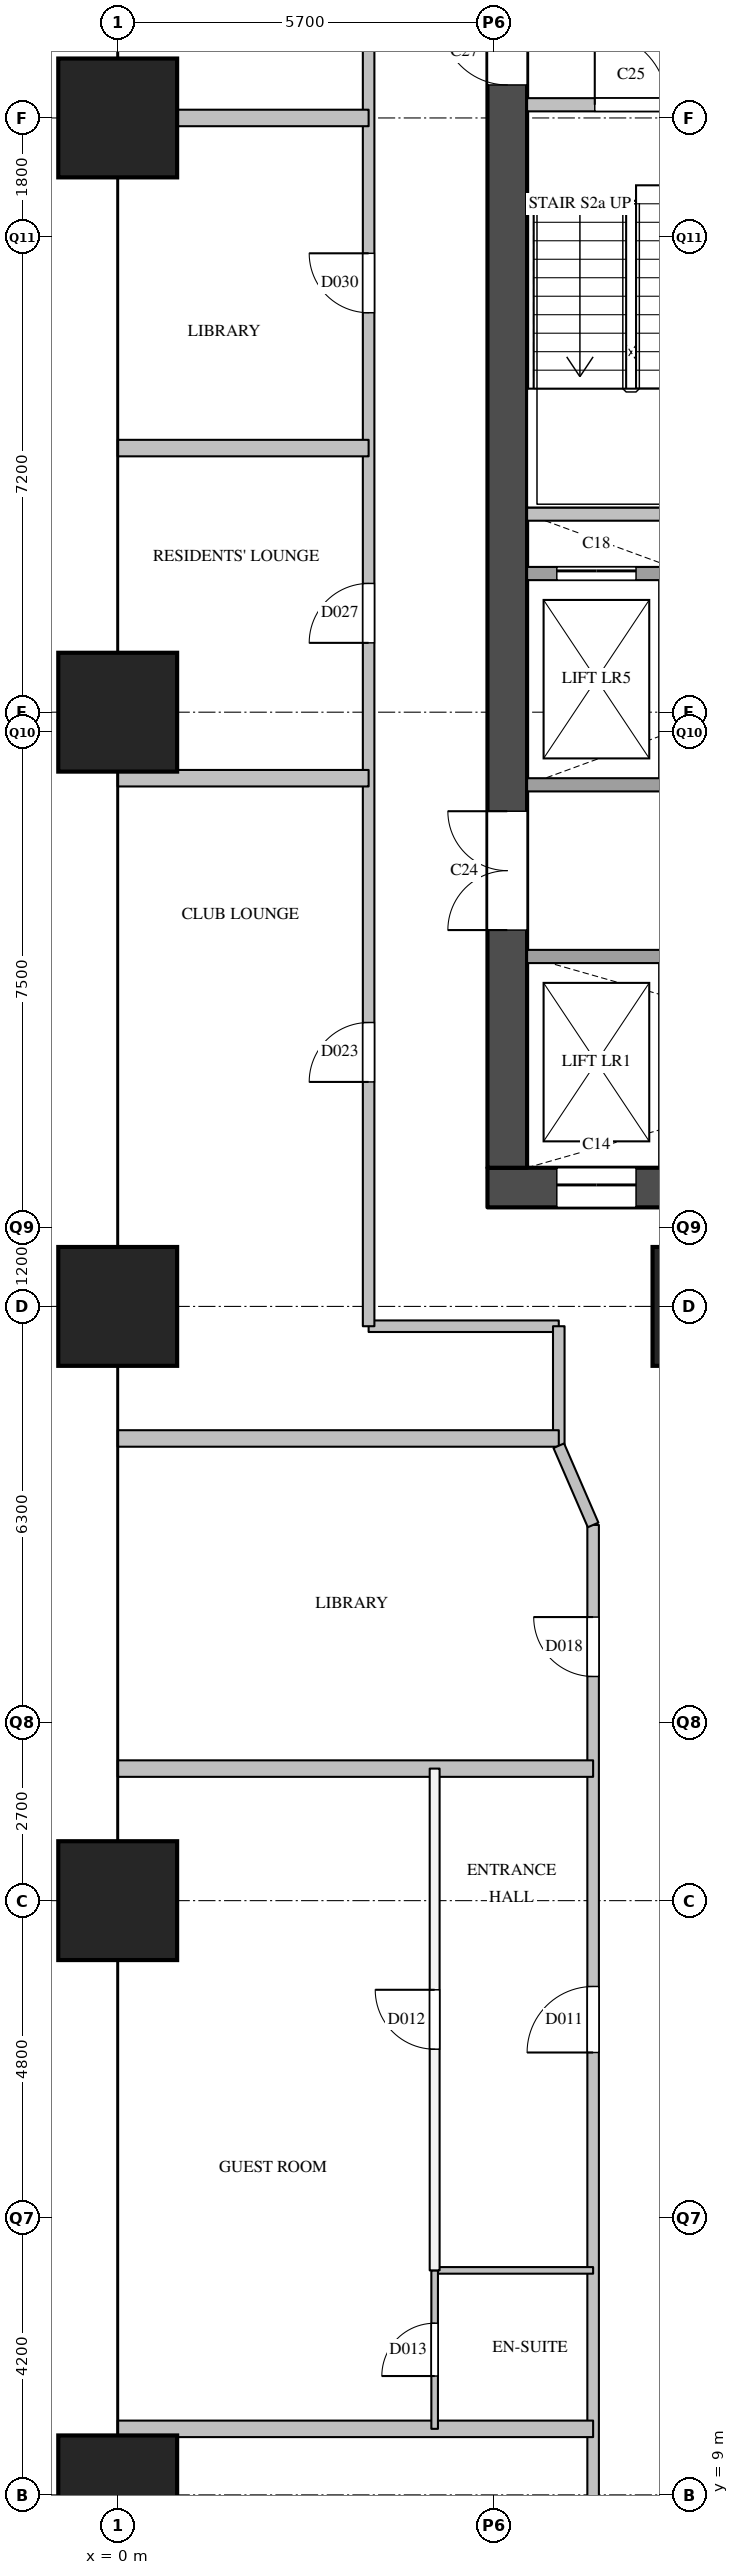
"""IFC4 building model, lengths in metres.
Left out: names, types, materials, properties, quantities, classifications, styles, units other than length and angle.
Written with IfcOpenShell. Run it as: python <this file> out.ifc"""

import sys

from ifc_helpers import new_model, si_unit, direction, frame, frame_2d, origin, origin_2d, place, context, subcontext, project, spatial, rectangle, extrude, element, fill, save


model = new_model("IFC4")
c1 = context("Model", 3, precision=1e-05, world=origin(), true_north=direction((0.0, 1.0)))
c2 = subcontext(c1, "Body", "Model", "MODEL_VIEW")
j1 = project(units=[si_unit("LENGTHUNIT", "METRE"), si_unit("PLANEANGLEUNIT", "RADIAN")], contexts=[c1])
p1 = place(None, origin())
s1 = spatial("IfcSite", under=j1, at=p1, CompositionType="ELEMENT")
p2 = place(p1, origin())
s2 = spatial("IfcBuilding", under=s1, at=p2, CompositionType="ELEMENT")
p3 = place(p2, frame((0.0, 0.0, 42.4)))
s3 = spatial("IfcBuildingStorey", under=s2, at=p3, CompositionType="ELEMENT", Elevation=42.4)
for number, where, z_axis, x_axis in (
    (1, (0.0, 9.0, 0.0), (0.0, 0.0, 1.0), (1.0, 0.0, 0.0)),
    (2, (0.0, 18.0, 0.0), (0.0, 0.0, 1.0), (1.0, 0.0, 0.0)),
    (3, (0.0, 27.0, 0.0), (0.0, 0.0, 1.0), (1.0, 0.0, 0.0)),
    (4, (0.0, 36.0, 0.0), (0.0, 0.0, 1.0), (1.0, 0.0, 0.0)),
    (5, (0.0, 45.0, 0.0), (0.0, 0.0, 1.0), (1.0, 0.0, 0.0)),
    (6, (9.0, 27.0, 0.0), (0.0, 0.0, 1.0), (1.0, 0.0, 0.0)),
):
    element("IfcColumn", number, at=place(p3, frame(where, z_axis=z_axis, x_axis=x_axis)), inside=s3, PredefinedType="COLUMN", context=c2, shape_type="SweptSolid", body=[
        extrude(rectangle(XDim=1.8, YDim=1.8, at=origin_2d()), origin(), (0.0, 0.0, 1.0), 3.8),
    ])
p4 = place(p3, frame((5.6, 28.8, 0.0), z_axis=(0.0, 0.0, 1.0), x_axis=(1.0, 0.0, 0.0)))
e7 = element("IfcWall", 7, at=p4, inside=s3, PredefinedType="SHEAR", context=c2, shape_type="SweptSolid", body=[
    extrude(rectangle(XDim=12.4, YDim=0.6, at=frame_2d((6.2, 0.0))), origin(), (0.0, 0.0, 1.0), 3.5),
])
p5 = place(p4, frame((1.05, 0.0, 0.0)))
e8 = element("IfcOpeningElement", 8, at=p5, cuts=e7, PredefinedType="OPENING", context=c2, shape_type="SweptSolid", body=[
    extrude(rectangle(XDim=1.2, YDim=2.1, at=frame_2d((0.6, 1.05))), frame((0.0, 0.31, 0.0), z_axis=(0.0, -1.0, 0.0), x_axis=(1.0, 0.0, 0.0)), (0.0, 0.0, 1.0), 0.62),
])
p6 = place(p4, frame((5.25, 0.0, 0.0)))
e9 = element("IfcOpeningElement", 9, at=p6, cuts=e7, PredefinedType="OPENING", context=c2, shape_type="SweptSolid", body=[
    extrude(rectangle(XDim=1.2, YDim=2.1, at=frame_2d((0.6, 1.05))), frame((0.0, 0.31, 0.0), z_axis=(0.0, -1.0, 0.0), x_axis=(1.0, 0.0, 0.0)), (0.0, 0.0, 1.0), 0.62),
])
p7 = place(p4, frame((7.35, 0.0, 0.0)))
e10 = element("IfcOpeningElement", 10, at=p7, cuts=e7, PredefinedType="OPENING", context=c2, shape_type="SweptSolid", body=[
    extrude(rectangle(XDim=1.2, YDim=2.1, at=frame_2d((0.6, 1.05))), frame((0.0, 0.31, 0.0), z_axis=(0.0, -1.0, 0.0), x_axis=(1.0, 0.0, 0.0)), (0.0, 0.0, 1.0), 0.62),
])
p8 = place(p3, frame((5.9, 29.1, 0.0), z_axis=(0.0, 0.0, 1.0), x_axis=(0.0, 1.0, 0.0)))
e11 = element("IfcWall", 11, at=p8, inside=s3, PredefinedType="SHEAR", context=c2, shape_type="SweptSolid", body=[
    extrude(rectangle(XDim=20.3, YDim=0.6, at=frame_2d((10.15, 0.0))), origin(), (0.0, 0.0, 1.0), 3.5),
])
p9 = place(p8, frame((3.6, 0.0, 0.0)))
e12 = element("IfcOpeningElement", 12, at=p9, cuts=e11, PredefinedType="OPENING", context=c2, shape_type="SweptSolid", body=[
    extrude(rectangle(XDim=1.8, YDim=2.1, at=frame_2d((0.9, 1.05))), frame((0.0, 0.31, 0.0), z_axis=(0.0, -1.0, 0.0), x_axis=(1.0, 0.0, 0.0)), (0.0, 0.0, 1.0), 0.62),
])
p10 = place(p8, frame((16.4, 0.0, 0.0)))
e13 = element("IfcOpeningElement", 13, at=p10, cuts=e11, PredefinedType="OPENING", context=c2, shape_type="SweptSolid", body=[
    extrude(rectangle(XDim=1.0, YDim=2.1, at=frame_2d((0.5, 1.05))), frame((0.0, 0.31, 0.0), z_axis=(0.0, -1.0, 0.0), x_axis=(1.0, 0.0, 0.0)), (0.0, 0.0, 1.0), 0.62),
])
p11 = place(p3, frame((6.2, 32.3, 0.0), z_axis=(0.0, 0.0, 1.0), x_axis=(1.0, 0.0, 0.0)))
e14 = element("IfcWall", 14, at=p11, inside=s3, PredefinedType="SOLIDWALL", context=c2, shape_type="SweptSolid", body=[
    extrude(rectangle(XDim=11.2, YDim=0.2, at=frame_2d((5.6, 0.0))), origin(), (0.0, 0.0, 1.0), 3.5),
])
p12 = place(p11, frame((2.55, 0.0, 0.0)))
e15 = element("IfcOpeningElement", 15, at=p12, cuts=e14, PredefinedType="OPENING", context=c2, shape_type="SweptSolid", body=[
    extrude(rectangle(XDim=1.2, YDim=2.1, at=frame_2d((0.6, 1.05))), frame((0.0, 0.11, 0.0), z_axis=(0.0, -1.0, 0.0), x_axis=(1.0, 0.0, 0.0)), (0.0, 0.0, 1.0), 0.22),
])
p13 = place(p3, frame((6.2, 34.9, 0.0), z_axis=(0.0, 0.0, 1.0), x_axis=(1.0, 0.0, 0.0)))
e16 = element("IfcWall", 16, at=p13, inside=s3, PredefinedType="SOLIDWALL", context=c2, shape_type="SweptSolid", body=[
    extrude(rectangle(XDim=11.2, YDim=0.2, at=frame_2d((5.6, 0.0))), origin(), (0.0, 0.0, 1.0), 3.5),
])
p14 = place(p3, frame((6.2, 38.1, 0.0), z_axis=(0.0, 0.0, 1.0), x_axis=(1.0, 0.0, 0.0)))
e17 = element("IfcWall", 17, at=p14, inside=s3, PredefinedType="SOLIDWALL", context=c2, shape_type="SweptSolid", body=[
    extrude(rectangle(XDim=11.2, YDim=0.2, at=frame_2d((5.6, 0.0))), origin(), (0.0, 0.0, 1.0), 3.5),
])
p15 = place(p14, frame((0.45, 0.0, 0.0)))
e18 = element("IfcOpeningElement", 18, at=p15, cuts=e17, PredefinedType="OPENING", context=c2, shape_type="SweptSolid", body=[
    extrude(rectangle(XDim=1.2, YDim=2.1, at=frame_2d((0.6, 1.05))), frame((0.0, 0.11, 0.0), z_axis=(0.0, -1.0, 0.0), x_axis=(1.0, 0.0, 0.0)), (0.0, 0.0, 1.0), 0.22),
])
p16 = place(p14, frame((2.55, 0.0, 0.0)))
e19 = element("IfcOpeningElement", 19, at=p16, cuts=e17, PredefinedType="OPENING", context=c2, shape_type="SweptSolid", body=[
    extrude(rectangle(XDim=1.2, YDim=2.1, at=frame_2d((0.6, 1.05))), frame((0.0, 0.11, 0.0), z_axis=(0.0, -1.0, 0.0), x_axis=(1.0, 0.0, 0.0)), (0.0, 0.0, 1.0), 0.22),
])
p17 = place(p14, frame((4.65, 0.0, 0.0)))
e20 = element("IfcOpeningElement", 20, at=p17, cuts=e17, PredefinedType="OPENING", context=c2, shape_type="SweptSolid", body=[
    extrude(rectangle(XDim=1.2, YDim=2.1, at=frame_2d((0.6, 1.05))), frame((0.0, 0.11, 0.0), z_axis=(0.0, -1.0, 0.0), x_axis=(1.0, 0.0, 0.0)), (0.0, 0.0, 1.0), 0.22),
])
p18 = place(p14, frame((6.75, 0.0, 0.0)))
e21 = element("IfcOpeningElement", 21, at=p18, cuts=e17, PredefinedType="OPENING", context=c2, shape_type="SweptSolid", body=[
    extrude(rectangle(XDim=1.2, YDim=2.1, at=frame_2d((0.6, 1.05))), frame((0.0, 0.11, 0.0), z_axis=(0.0, -1.0, 0.0), x_axis=(1.0, 0.0, 0.0)), (0.0, 0.0, 1.0), 0.22),
])
p19 = place(p3, frame((6.2, 39.0, 0.0), z_axis=(0.0, 0.0, 1.0), x_axis=(1.0, 0.0, 0.0)))
e22 = element("IfcWall", 22, at=p19, inside=s3, PredefinedType="SOLIDWALL", context=c2, shape_type="SweptSolid", body=[
    extrude(rectangle(XDim=3.05, YDim=0.2, at=frame_2d((1.525, 0.0))), origin(), (0.0, 0.0, 1.0), 3.5),
])
p20 = place(p3, frame((6.2, 45.2, 0.0), z_axis=(0.0, 0.0, 1.0), x_axis=(1.0, 0.0, 0.0)))
e23 = element("IfcWall", 23, at=p20, inside=s3, PredefinedType="SOLIDWALL", context=c2, shape_type="SweptSolid", body=[
    extrude(rectangle(XDim=6.3, YDim=0.2, at=frame_2d((3.15, 0.0))), origin(), (0.0, 0.0, 1.0), 3.5),
])
p21 = place(p20, frame((1.025, 0.0, 0.0)))
e24 = element("IfcOpeningElement", 24, at=p21, cuts=e23, PredefinedType="OPENING", context=c2, shape_type="SweptSolid", body=[
    extrude(rectangle(XDim=1.1, YDim=2.1, at=frame_2d((0.55, 1.05))), frame((0.0, 0.11, 0.0), z_axis=(0.0, -1.0, 0.0), x_axis=(1.0, 0.0, 0.0)), (0.0, 0.0, 1.0), 0.22),
])
p22 = place(p20, frame((4.175, 0.0, 0.0)))
e25 = element("IfcOpeningElement", 25, at=p22, cuts=e23, PredefinedType="OPENING", context=c2, shape_type="SweptSolid", body=[
    extrude(rectangle(XDim=1.1, YDim=2.1, at=frame_2d((0.55, 1.05))), frame((0.0, 0.11, 0.0), z_axis=(0.0, -1.0, 0.0), x_axis=(1.0, 0.0, 0.0)), (0.0, 0.0, 1.0), 0.22),
])
p23 = place(p3, frame((3.8, 26.7, 0.0), z_axis=(0.0, 0.0, 1.0), x_axis=(1.0, 0.0, 0.0)))
e26 = element("IfcWall", 26, at=p23, inside=s3, PredefinedType="PARTITIONING", context=c2, shape_type="SweptSolid", body=[
    extrude(rectangle(XDim=2.88, YDim=0.175, at=frame_2d((1.44, 0.0))), origin(), (0.0, 0.0, 1.0), 2.5),
])
p24 = place(p3, frame((3.8, 26.7, 0.0), z_axis=(0.0, 0.0, 1.0), x_axis=(0.0, 1.0, 0.0)))
e27 = element("IfcWall", 27, at=p24, inside=s3, PredefinedType="PARTITIONING", context=c2, shape_type="SweptSolid", body=[
    extrude(rectangle(XDim=25.1, YDim=0.175, at=frame_2d((12.55, 0.0))), origin(), (0.0, 0.0, 1.0), 2.5),
])
p25 = place(p24, frame((3.7, 0.0, 0.0)))
e28 = element("IfcOpeningElement", 28, at=p25, cuts=e27, PredefinedType="OPENING", context=c2, shape_type="SweptSolid", body=[
    extrude(rectangle(XDim=0.9, YDim=2.1, at=frame_2d((0.45, 1.05))), frame((0.0, 0.097, 0.0), z_axis=(0.0, -1.0, 0.0), x_axis=(1.0, 0.0, 0.0)), (0.0, 0.0, 1.0), 0.195),
])
p26 = place(p24, frame((10.35, 0.0, 0.0)))
e29 = element("IfcOpeningElement", 29, at=p26, cuts=e27, PredefinedType="OPENING", context=c2, shape_type="SweptSolid", body=[
    extrude(rectangle(XDim=0.9, YDim=2.1, at=frame_2d((0.45, 1.05))), frame((0.0, 0.097, 0.0), z_axis=(0.0, -1.0, 0.0), x_axis=(1.0, 0.0, 0.0)), (0.0, 0.0, 1.0), 0.195),
])
p27 = place(p24, frame((15.35, 0.0, 0.0)))
e30 = element("IfcOpeningElement", 30, at=p27, cuts=e27, PredefinedType="OPENING", context=c2, shape_type="SweptSolid", body=[
    extrude(rectangle(XDim=0.9, YDim=2.1, at=frame_2d((0.45, 1.05))), frame((0.0, 0.097, 0.0), z_axis=(0.0, -1.0, 0.0), x_axis=(1.0, 0.0, 0.0)), (0.0, 0.0, 1.0), 0.195),
])
p28 = place(p24, frame((21.25, 0.0, 0.0)))
e31 = element("IfcOpeningElement", 31, at=p28, cuts=e27, PredefinedType="OPENING", context=c2, shape_type="SweptSolid", body=[
    extrude(rectangle(XDim=0.9, YDim=2.1, at=frame_2d((0.45, 1.05))), frame((0.0, 0.097, 0.0), z_axis=(0.0, -1.0, 0.0), x_axis=(1.0, 0.0, 0.0)), (0.0, 0.0, 1.0), 0.195),
])
p29 = place(p3, frame((6.68, 24.89, 0.0), z_axis=(0.0, 0.0, 1.0), x_axis=(0.0, 1.0, 0.0)))
e32 = element("IfcWall", 32, at=p29, inside=s3, PredefinedType="PARTITIONING", context=c2, shape_type="SweptSolid", body=[
    extrude(rectangle(XDim=1.81, YDim=0.175, at=frame_2d((0.905, 0.0))), origin(), (0.0, 0.0, 1.0), 2.5),
])
p30 = place(p3, frame((7.2, 7.2, 0.0), z_axis=(0.0, 0.0, 1.0), x_axis=(0.0, 1.0, 0.0)))
e33 = element("IfcWall", 33, at=p30, inside=s3, PredefinedType="PARTITIONING", context=c2, shape_type="SweptSolid", body=[
    extrude(rectangle(XDim=16.49, YDim=0.175, at=frame_2d((8.245, 0.0))), origin(), (0.0, 0.0, 1.0), 3.5),
])
p31 = place(p30, frame((8.5, 0.0, 0.0)))
e34 = element("IfcOpeningElement", 34, at=p31, cuts=e33, PredefinedType="OPENING", context=c2, shape_type="SweptSolid", body=[
    extrude(rectangle(XDim=1.0, YDim=2.1, at=frame_2d((0.5, 1.05))), frame((0.0, 0.097, 0.0), z_axis=(0.0, -1.0, 0.0), x_axis=(1.0, 0.0, 0.0)), (0.0, 0.0, 1.0), 0.195),
])
p32 = place(p30, frame((14.195, 0.0, 0.0)))
e35 = element("IfcOpeningElement", 35, at=p32, cuts=e33, PredefinedType="OPENING", context=c2, shape_type="SweptSolid", body=[
    extrude(rectangle(XDim=0.9, YDim=2.1, at=frame_2d((0.45, 1.05))), frame((0.0, 0.097, 0.0), z_axis=(0.0, -1.0, 0.0), x_axis=(1.0, 0.0, 0.0)), (0.0, 0.0, 1.0), 0.195),
])
p33 = place(p3, frame((4.8, 12.4, 0.0), z_axis=(0.0, 0.0, 1.0), x_axis=(0.0, 1.0, 0.0)))
e36 = element("IfcWall", 36, at=p33, inside=s3, PredefinedType="PARTITIONING", context=c2, shape_type="SweptSolid", body=[
    extrude(rectangle(XDim=7.6, YDim=0.15, at=frame_2d((3.8, 0.0))), origin(), (0.0, 0.0, 1.0), 3.5),
])
p34 = place(p33, frame((3.35, 0.0, 0.0)))
e37 = element("IfcOpeningElement", 37, at=p34, cuts=e36, PredefinedType="OPENING", context=c2, shape_type="SweptSolid", body=[
    extrude(rectangle(XDim=0.9, YDim=2.1, at=frame_2d((0.45, 1.05))), frame((0.0, 0.085, 0.0), z_axis=(0.0, -1.0, 0.0), x_axis=(1.0, 0.0, 0.0)), (0.0, 0.0, 1.0), 0.17),
])
for number, where, z_axis, x_axis in (
    (38, (0.0, 10.0, 0.0), (0.0, 0.0, 1.0), (1.0, 0.0, 0.0)),
    (39, (0.0, 20.0, 0.0), (0.0, 0.0, 1.0), (1.0, 0.0, 0.0)),
):
    element("IfcWall", number, at=place(p3, frame(where, z_axis=z_axis, x_axis=x_axis)), inside=s3, PredefinedType="PARTITIONING", context=c2, shape_type="SweptSolid", body=[
        extrude(rectangle(XDim=7.2, YDim=0.25, at=frame_2d((3.6, 0.0))), origin(), (0.0, 0.0, 1.0), 2.5),
    ])
p35 = place(p3, frame((0.0, 25.0, 0.0), z_axis=(0.0, 0.0, 1.0), x_axis=(1.0, 0.0, 0.0)))
e40 = element("IfcWall", 40, at=p35, inside=s3, PredefinedType="PARTITIONING", context=c2, shape_type="SweptSolid", body=[
    extrude(rectangle(XDim=6.68, YDim=0.25, at=frame_2d((3.34, 0.0))), origin(), (0.0, 0.0, 1.0), 2.5),
])
for number, where, z_axis, x_axis in (
    (41, (0.0, 35.0, 0.0), (0.0, 0.0, 1.0), (1.0, 0.0, 0.0)),
    (42, (0.0, 40.0, 0.0), (0.0, 0.0, 1.0), (1.0, 0.0, 0.0)),
):
    element("IfcWall", number, at=place(p3, frame(where, z_axis=z_axis, x_axis=x_axis)), inside=s3, PredefinedType="PARTITIONING", context=c2, shape_type="SweptSolid", body=[
        extrude(rectangle(XDim=3.8, YDim=0.25, at=frame_2d((1.9, 0.0))), origin(), (0.0, 0.0, 1.0), 2.5),
    ])
p36 = place(p3, frame((0.0, 45.0, 0.0), z_axis=(0.0, 0.0, 1.0), x_axis=(1.0, 0.0, 0.0)))
e43 = element("IfcWall", 43, at=p36, inside=s3, PredefinedType="PARTITIONING", context=c2, shape_type="SweptSolid", body=[
    extrude(rectangle(XDim=3.8, YDim=0.25, at=frame_2d((1.9, 0.0))), origin(), (0.0, 0.0, 1.0), 3.5),
])
p37 = place(p3, frame((4.8, 12.4, 0.0), z_axis=(0.0, 0.0, 1.0), x_axis=(1.0, 0.0, 0.0)))
e44 = element("IfcWall", 44, at=p37, inside=s3, PredefinedType="PARTITIONING", context=c2, shape_type="SweptSolid", body=[
    extrude(rectangle(XDim=2.4, YDim=0.1, at=frame_2d((1.2, 0.0))), origin(), (0.0, 0.0, 1.0), 3.5),
])
p38 = place(p3, frame((4.8, 10.0, 0.0), z_axis=(0.0, 0.0, 1.0), x_axis=(0.0, 1.0, 0.0)))
e45 = element("IfcWall", 45, at=p38, inside=s3, PredefinedType="PARTITIONING", context=c2, shape_type="SweptSolid", body=[
    extrude(rectangle(XDim=2.4, YDim=0.1, at=frame_2d((1.2, 0.0))), origin(), (0.0, 0.0, 1.0), 3.5),
])
p39 = place(p38, frame((0.8, 0.0, 0.0)))
e46 = element("IfcOpeningElement", 46, at=p39, cuts=e45, PredefinedType="OPENING", context=c2, shape_type="SweptSolid", body=[
    extrude(rectangle(XDim=0.8, YDim=2.1, at=frame_2d((0.4, 1.05))), frame((0.0, 0.06, 0.0), z_axis=(0.0, -1.0, 0.0), x_axis=(1.0, 0.0, 0.0)), (0.0, 0.0, 1.0), 0.12),
])
p40 = place(p3, frame((7.2, 23.69, 0.0), z_axis=(0.0, 0.0, 1.0), x_axis=(-0.397633632391, 0.917544273804, 0.0)))
e47 = element("IfcWall", 47, at=p40, inside=s3, PredefinedType="PARTITIONING", context=c2, shape_type="SweptSolid", body=[
    extrude(rectangle(XDim=1.308, YDim=0.175, at=frame_2d((0.654, 0.0))), origin(), (0.0, 0.0, 1.0), 3.5),
])
p41 = place(p5, origin())
e48 = element("IfcDoor", 48, at=p41, inside=s3, OperationType="SLIDING_TO_LEFT", PredefinedType="DOOR", context=c2, shape_type="SweptSolid", body=[
    extrude(rectangle(XDim=1.2, YDim=2.1, at=frame_2d((0.6, 1.05))), frame((0.0, 0.025, 0.0), z_axis=(0.0, -1.0, 0.0), x_axis=(1.0, 0.0, 0.0)), (0.0, 0.0, 1.0), 0.05),
])
fill(e8, e48)
p42 = place(p15, origin())
e49 = element("IfcDoor", 49, at=p42, inside=s3, OperationType="SLIDING_TO_LEFT", PredefinedType="DOOR", context=c2, shape_type="SweptSolid", body=[
    extrude(rectangle(XDim=1.2, YDim=2.1, at=frame_2d((0.6, 1.05))), frame((0.0, 0.025, 0.0), z_axis=(0.0, -1.0, 0.0), x_axis=(1.0, 0.0, 0.0)), (0.0, 0.0, 1.0), 0.05),
])
fill(e18, e49)
p43 = place(p9, origin())
e50 = element("IfcDoor", 50, at=p43, inside=s3, OperationType="DOUBLE_DOOR_SINGLE_SWING", PredefinedType="DOOR", context=c2, shape_type="SweptSolid", body=[
    extrude(rectangle(XDim=1.8, YDim=2.1, at=frame_2d((0.9, 1.05))), frame((0.0, 0.025, 0.0), z_axis=(0.0, -1.0, 0.0), x_axis=(1.0, 0.0, 0.0)), (0.0, 0.0, 1.0), 0.05),
])
fill(e12, e50)
p44 = place(p21, origin())
e51 = element("IfcDoor", 51, at=p44, inside=s3, OperationType="SINGLE_SWING_LEFT", PredefinedType="DOOR", context=c2, shape_type="SweptSolid", body=[
    extrude(rectangle(XDim=1.1, YDim=2.1, at=frame_2d((0.55, 1.05))), frame((0.0, 0.025, 0.0), z_axis=(0.0, -1.0, 0.0), x_axis=(1.0, 0.0, 0.0)), (0.0, 0.0, 1.0), 0.05),
])
fill(e24, e51)
p45 = place(p10, origin())
e52 = element("IfcDoor", 52, at=p45, inside=s3, OperationType="SINGLE_SWING_RIGHT", PredefinedType="DOOR", context=c2, shape_type="SweptSolid", body=[
    extrude(rectangle(XDim=1.0, YDim=2.1, at=frame_2d((0.5, 1.05))), frame((0.0, 0.025, 0.0), z_axis=(0.0, -1.0, 0.0), x_axis=(1.0, 0.0, 0.0)), (0.0, 0.0, 1.0), 0.05),
])
fill(e13, e52)
p46 = place(p31, origin())
e53 = element("IfcDoor", 53, at=p46, inside=s3, OperationType="SINGLE_SWING_LEFT", PredefinedType="DOOR", context=c2, shape_type="SweptSolid", body=[
    extrude(rectangle(XDim=1.0, YDim=2.1, at=frame_2d((0.5, 1.05))), frame((0.0, 0.025, 0.0), z_axis=(0.0, -1.0, 0.0), x_axis=(1.0, 0.0, 0.0)), (0.0, 0.0, 1.0), 0.05),
])
fill(e34, e53)
p47 = place(p34, origin())
e54 = element("IfcDoor", 54, at=p47, inside=s3, OperationType="SINGLE_SWING_RIGHT", PredefinedType="DOOR", context=c2, shape_type="SweptSolid", body=[
    extrude(rectangle(XDim=0.9, YDim=2.1, at=frame_2d((0.45, 1.05))), frame((0.0, 0.025, 0.0), z_axis=(0.0, -1.0, 0.0), x_axis=(1.0, 0.0, 0.0)), (0.0, 0.0, 1.0), 0.05),
])
fill(e37, e54)
p48 = place(p39, origin())
e55 = element("IfcDoor", 55, at=p48, inside=s3, OperationType="SINGLE_SWING_LEFT", PredefinedType="DOOR", context=c2, shape_type="SweptSolid", body=[
    extrude(rectangle(XDim=0.8, YDim=2.1, at=frame_2d((0.4, 1.05))), frame((0.0, 0.025, 0.0), z_axis=(0.0, -1.0, 0.0), x_axis=(1.0, 0.0, 0.0)), (0.0, 0.0, 1.0), 0.05),
])
fill(e46, e55)
p49 = place(p32, origin())
e56 = element("IfcDoor", 56, at=p49, inside=s3, OperationType="SINGLE_SWING_RIGHT", PredefinedType="DOOR", context=c2, shape_type="SweptSolid", body=[
    extrude(rectangle(XDim=0.9, YDim=2.1, at=frame_2d((0.45, 1.05))), frame((0.0, 0.025, 0.0), z_axis=(0.0, -1.0, 0.0), x_axis=(1.0, 0.0, 0.0)), (0.0, 0.0, 1.0), 0.05),
])
fill(e35, e56)
p50 = place(p25, origin())
e57 = element("IfcDoor", 57, at=p50, inside=s3, OperationType="SINGLE_SWING_LEFT", PredefinedType="DOOR", context=c2, shape_type="SweptSolid", body=[
    extrude(rectangle(XDim=0.9, YDim=2.1, at=frame_2d((0.45, 1.05))), frame((0.0, 0.025, 0.0), z_axis=(0.0, -1.0, 0.0), x_axis=(1.0, 0.0, 0.0)), (0.0, 0.0, 1.0), 0.05),
])
fill(e28, e57)
p51 = place(p26, origin())
e58 = element("IfcDoor", 58, at=p51, inside=s3, OperationType="SINGLE_SWING_LEFT", PredefinedType="DOOR", context=c2, shape_type="SweptSolid", body=[
    extrude(rectangle(XDim=0.9, YDim=2.1, at=frame_2d((0.45, 1.05))), frame((0.0, 0.025, 0.0), z_axis=(0.0, -1.0, 0.0), x_axis=(1.0, 0.0, 0.0)), (0.0, 0.0, 1.0), 0.05),
])
fill(e29, e58)
p52 = place(p27, origin())
e59 = element("IfcDoor", 59, at=p52, inside=s3, OperationType="SINGLE_SWING_RIGHT", PredefinedType="DOOR", context=c2, shape_type="SweptSolid", body=[
    extrude(rectangle(XDim=0.9, YDim=2.1, at=frame_2d((0.45, 1.05))), frame((0.0, 0.025, 0.0), z_axis=(0.0, -1.0, 0.0), x_axis=(1.0, 0.0, 0.0)), (0.0, 0.0, 1.0), 0.05),
])
fill(e30, e59)
save(model, sys.argv[1])
